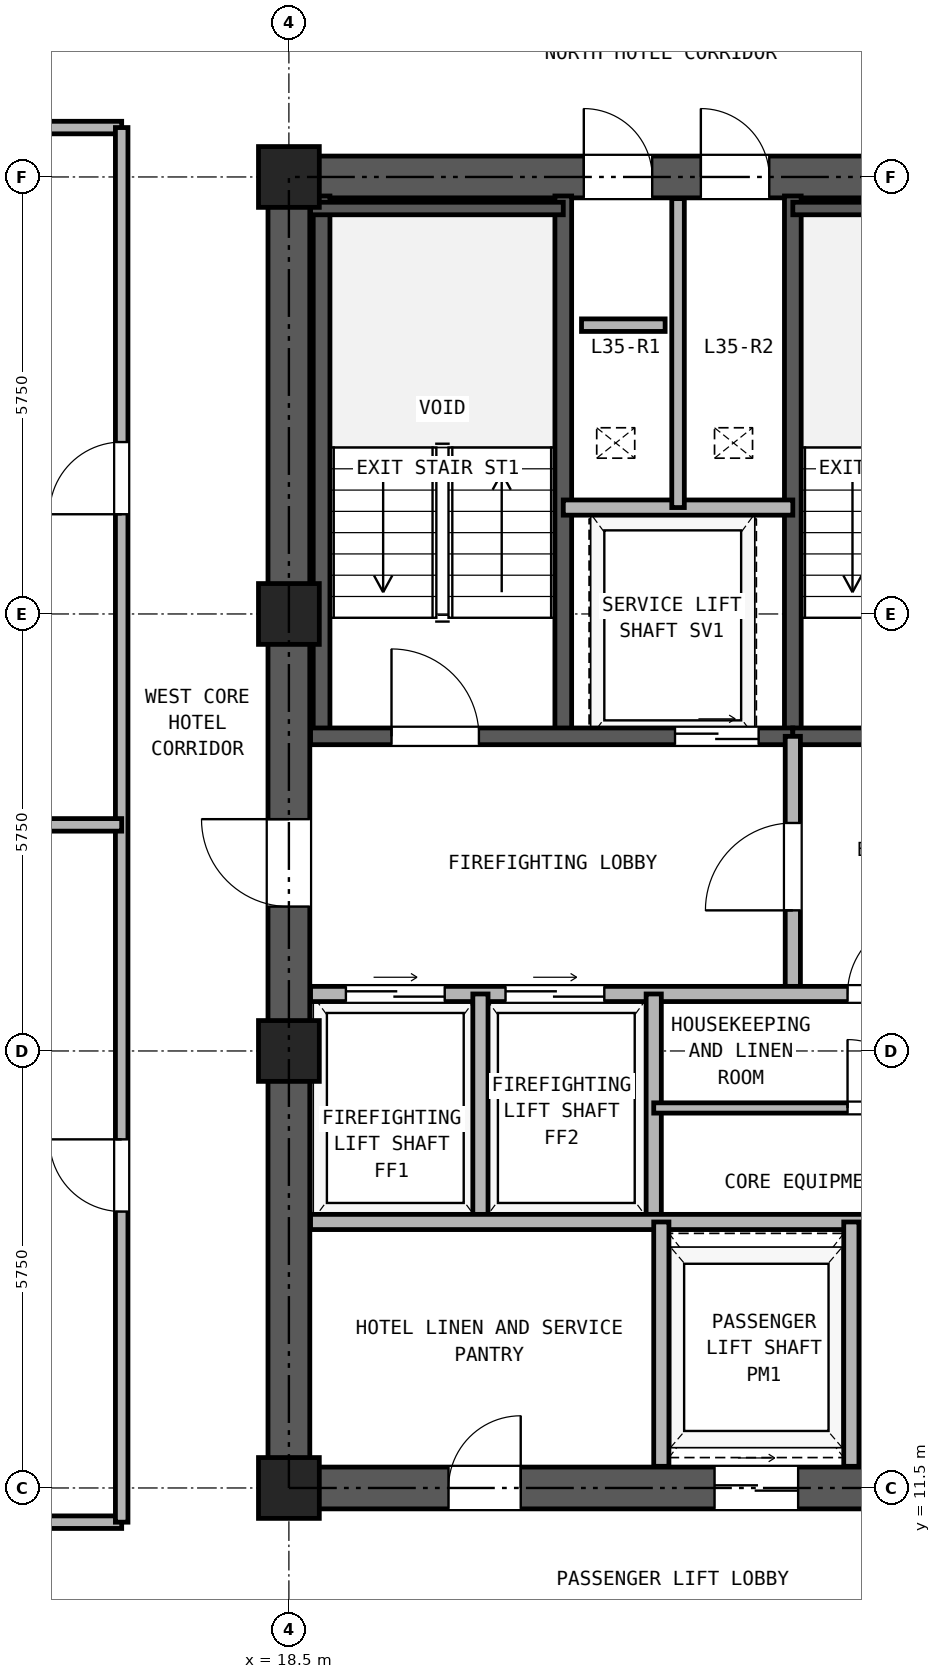
"""IFC4 building model, lengths in metres.
Left out: names, types, materials, properties, quantities, classifications, styles, units other than length and angle.
Written with IfcOpenShell. Run it as: python <this file> out.ifc"""

import sys

from ifc_helpers import new_model, si_unit, direction, frame, frame_2d, origin, origin_2d, place, context, subcontext, project, spatial, rectangle, hollow_rectangle, extrude, source, transform, mapped, element, fill, save


model = new_model("IFC4")
c1 = context("Model", 3, precision=1e-05, world=origin(), true_north=direction((0.0, 1.0)))
c2 = subcontext(c1, "Body", "Model", "MODEL_VIEW")
j1 = project(units=[si_unit("LENGTHUNIT", "METRE"), si_unit("PLANEANGLEUNIT", "RADIAN")], contexts=[c1])
p1 = place(None, origin())
s1 = spatial("IfcSite", under=j1, at=p1, CompositionType="ELEMENT")
p2 = place(p1, origin())
s2 = spatial("IfcBuilding", under=s1, at=p2, CompositionType="ELEMENT")
p3 = place(p2, frame((0.0, 0.0, 127.9)))
s3 = spatial("IfcBuildingStorey", under=s2, at=p3, CompositionType="ELEMENT", Elevation=127.9)
m1 = source(origin(), c2, "Body", "SweptSolid", [
    extrude(hollow_rectangle(XDim=0.8, YDim=0.8, WallThickness=0.045, at=origin_2d()), origin(), (0.0, 0.0, 1.0), 2.95),
])
for number, where, z_axis, x_axis in (
    (1, (18.5, 11.5, 0.0), (0.0, 0.0, 1.0), (1.0, 0.0, 0.0)),
    (2, (18.5, 17.25, 0.0), (0.0, 0.0, 1.0), (1.0, 0.0, 0.0)),
    (3, (18.5, 23.0, 0.0), (0.0, 0.0, 1.0), (1.0, 0.0, 0.0)),
    (4, (18.5, 28.75, 0.0), (0.0, 0.0, 1.0), (1.0, 0.0, 0.0)),
):
    element("IfcColumn", number, at=place(p3, frame(where, z_axis=z_axis, x_axis=x_axis)), inside=s3, PredefinedType="COLUMN", context=c2, shape_type="MappedRepresentation", body=[
        mapped(m1, transform((0.0, 0.0, 0.0), x_axis=(1.0, 0.0, 0.0), y_axis=(0.0, 1.0, 0.0), z_axis=(0.0, 0.0, 1.0), scale=1.0)),
    ])
p4 = place(p3, frame((18.225, 11.5, 0.0), z_axis=(0.0, 0.0, 1.0), x_axis=(1.0, 0.0, 0.0)))
e5 = element("IfcWall", 5, at=p4, inside=s3, PredefinedType="SHEAR", context=c2, shape_type="SweptSolid", body=[
    extrude(rectangle(XDim=10.55, YDim=0.55, at=frame_2d((5.275, 0.0))), origin(), (0.0, 0.0, 1.0), 2.95),
])
p5 = place(p4, frame((2.375, 0.0, 0.0)))
e6 = element("IfcOpeningElement", 6, at=p5, cuts=e5, PredefinedType="OPENING", context=c2, shape_type="SweptSolid", body=[
    extrude(rectangle(XDim=0.95, YDim=2.15, at=frame_2d((0.475, 1.075))), frame((0.0, 0.285, 0.0), z_axis=(0.0, -1.0, 0.0), x_axis=(1.0, 0.0, 0.0)), (0.0, 0.0, 1.0), 0.57),
])
p6 = place(p4, frame((5.875, 0.0, 0.0)))
e7 = element("IfcOpeningElement", 7, at=p6, cuts=e5, PredefinedType="OPENING", context=c2, shape_type="SweptSolid", body=[
    extrude(rectangle(XDim=1.1, YDim=2.25, at=frame_2d((0.55, 1.125))), frame((0.0, 0.285, 0.0), z_axis=(0.0, -1.0, 0.0), x_axis=(1.0, 0.0, 0.0)), (0.0, 0.0, 1.0), 0.57),
])
p7 = place(p4, frame((8.275, 0.0, 0.0)))
e8 = element("IfcOpeningElement", 8, at=p7, cuts=e5, PredefinedType="OPENING", context=c2, shape_type="SweptSolid", body=[
    extrude(rectangle(XDim=1.1, YDim=2.25, at=frame_2d((0.55, 1.125))), frame((0.0, 0.285, 0.0), z_axis=(0.0, -1.0, 0.0), x_axis=(1.0, 0.0, 0.0)), (0.0, 0.0, 1.0), 0.57),
])
p8 = place(p3, frame((18.225, 28.75, 0.0), z_axis=(0.0, 0.0, 1.0), x_axis=(1.0, 0.0, 0.0)))
e9 = element("IfcWall", 9, at=p8, inside=s3, PredefinedType="SHEAR", context=c2, shape_type="SweptSolid", body=[
    extrude(rectangle(XDim=10.55, YDim=0.55, at=frame_2d((5.275, 0.0))), origin(), (0.0, 0.0, 1.0), 2.95),
])
p9 = place(p8, frame((4.155, 0.0, 0.0)))
e10 = element("IfcOpeningElement", 10, at=p9, cuts=e9, PredefinedType="OPENING", context=c2, shape_type="SweptSolid", body=[
    extrude(rectangle(XDim=0.9, YDim=2.05, at=frame_2d((0.45, 1.025))), frame((0.0, 0.285, 0.0), z_axis=(0.0, -1.0, 0.0), x_axis=(1.0, 0.0, 0.0)), (0.0, 0.0, 1.0), 0.57),
])
p10 = place(p8, frame((5.695, 0.0, 0.0)))
e11 = element("IfcOpeningElement", 11, at=p10, cuts=e9, PredefinedType="OPENING", context=c2, shape_type="SweptSolid", body=[
    extrude(rectangle(XDim=0.9, YDim=2.05, at=frame_2d((0.45, 1.025))), frame((0.0, 0.285, 0.0), z_axis=(0.0, -1.0, 0.0), x_axis=(1.0, 0.0, 0.0)), (0.0, 0.0, 1.0), 0.57),
])
p11 = place(p3, frame((18.5, 11.775, 0.0), z_axis=(0.0, 0.0, 1.0), x_axis=(0.0, 1.0, 0.0)))
e12 = element("IfcWall", 12, at=p11, inside=s3, PredefinedType="SHEAR", context=c2, shape_type="SweptSolid", body=[
    extrude(rectangle(XDim=16.7, YDim=0.55, at=frame_2d((8.35, 0.0))), origin(), (0.0, 0.0, 1.0), 2.95),
])
p12 = place(p11, frame((7.375, 0.0, 0.0)))
e13 = element("IfcOpeningElement", 13, at=p12, cuts=e12, PredefinedType="OPENING", context=c2, shape_type="SweptSolid", body=[
    extrude(rectangle(XDim=1.15, YDim=2.2, at=frame_2d((0.575, 1.1))), frame((0.0, 0.285, 0.0), z_axis=(0.0, -1.0, 0.0), x_axis=(1.0, 0.0, 0.0)), (0.0, 0.0, 1.0), 0.57),
])
for number, where, z_axis, x_axis in (
    (14, (18.93, 21.39, 0.0), (0.0, 0.0, 1.0), (0.0, 1.0, 0.0)),
    (15, (22.11, 21.39, 0.0), (0.0, 0.0, 1.0), (0.0, 1.0, 0.0)),
    (16, (25.13, 21.39, 0.0), (0.0, 0.0, 1.0), (0.0, 1.0, 0.0)),
):
    element("IfcWall", number, at=place(p3, frame(where, z_axis=z_axis, x_axis=x_axis)), inside=s3, PredefinedType="SOLIDWALL", context=c2, shape_type="SweptSolid", body=[
        extrude(rectangle(XDim=7.11, YDim=0.22, at=frame_2d((3.555, 0.0))), origin(), (0.0, 0.0, 1.0), 2.95),
    ])
p13 = place(p3, frame((18.785, 28.335, 0.0), z_axis=(0.0, 0.0, 1.0), x_axis=(1.0, 0.0, 0.0)))
e17 = element("IfcWall", 17, at=p13, inside=s3, PredefinedType="PARTITIONING", context=c2, shape_type="SweptSolid", body=[
    extrude(rectangle(XDim=3.325, YDim=0.165, at=frame_2d((1.663, 0.0))), origin(), (0.0, 0.0, 1.0), 2.95),
])
p14 = place(p3, frame((25.13, 28.335, 0.0), z_axis=(0.0, 0.0, 1.0), x_axis=(1.0, 0.0, 0.0)))
e18 = element("IfcWall", 18, at=p14, inside=s3, PredefinedType="PARTITIONING", context=c2, shape_type="SweptSolid", body=[
    extrude(rectangle(XDim=3.085, YDim=0.165, at=frame_2d((1.542, 0.0))), origin(), (0.0, 0.0, 1.0), 2.95),
])
p15 = place(p3, frame((18.785, 21.39, 0.0), z_axis=(0.0, 0.0, 1.0), x_axis=(1.0, 0.0, 0.0)))
e19 = element("IfcWall", 19, at=p15, inside=s3, PredefinedType="SOLIDWALL", context=c2, shape_type="SweptSolid", body=[
    extrude(rectangle(XDim=6.345, YDim=0.22, at=frame_2d((3.172, 0.0))), origin(), (0.0, 0.0, 1.0), 2.95),
])
p16 = place(p15, frame((1.065, 0.0, 0.0)))
e20 = element("IfcOpeningElement", 20, at=p16, cuts=e19, PredefinedType="OPENING", context=c2, shape_type="SweptSolid", body=[
    extrude(rectangle(XDim=1.15, YDim=2.2, at=frame_2d((0.575, 1.1))), frame((0.0, 0.12, 0.0), z_axis=(0.0, -1.0, 0.0), x_axis=(1.0, 0.0, 0.0)), (0.0, 0.0, 1.0), 0.24),
])
p17 = place(p15, frame((4.795, 0.0, 0.0)))
e21 = element("IfcOpeningElement", 21, at=p17, cuts=e19, PredefinedType="OPENING", context=c2, shape_type="SweptSolid", body=[
    extrude(rectangle(XDim=1.1, YDim=2.25, at=frame_2d((0.55, 1.125))), frame((0.0, 0.12, 0.0), z_axis=(0.0, -1.0, 0.0), x_axis=(1.0, 0.0, 0.0)), (0.0, 0.0, 1.0), 0.24),
])
p18 = place(p3, frame((25.13, 21.39, 0.0), z_axis=(0.0, 0.0, 1.0), x_axis=(1.0, 0.0, 0.0)))
e22 = element("IfcWall", 22, at=p18, inside=s3, PredefinedType="SOLIDWALL", context=c2, shape_type="SweptSolid", body=[
    extrude(rectangle(XDim=3.085, YDim=0.22, at=frame_2d((1.542, 0.0))), origin(), (0.0, 0.0, 1.0), 2.95),
])
p19 = place(p18, frame((0.92, 0.0, 0.0)))
e23 = element("IfcOpeningElement", 23, at=p19, cuts=e22, PredefinedType="OPENING", context=c2, shape_type="SweptSolid", body=[
    extrude(rectangle(XDim=1.15, YDim=2.2, at=frame_2d((0.575, 1.1))), frame((0.0, 0.12, 0.0), z_axis=(0.0, -1.0, 0.0), x_axis=(1.0, 0.0, 0.0)), (0.0, 0.0, 1.0), 0.24),
])
p20 = place(p3, frame((22.11, 24.4, 0.0), z_axis=(0.0, 0.0, 1.0), x_axis=(1.0, 0.0, 0.0)))
e24 = element("IfcWall", 24, at=p20, inside=s3, PredefinedType="PARTITIONING", context=c2, shape_type="SweptSolid", body=[
    extrude(rectangle(XDim=3.02, YDim=0.2, at=frame_2d((1.51, 0.0))), origin(), (0.0, 0.0, 1.0), 2.95),
])
p21 = place(p3, frame((23.62, 24.4, 0.0), z_axis=(0.0, 0.0, 1.0), x_axis=(0.0, 1.0, 0.0)))
e25 = element("IfcWall", 25, at=p21, inside=s3, PredefinedType="PARTITIONING", context=c2, shape_type="SweptSolid", body=[
    extrude(rectangle(XDim=4.065, YDim=0.165, at=frame_2d((2.033, 0.0))), origin(), (0.0, 0.0, 1.0), 2.95),
])
p22 = place(p3, frame((25.13, 18.0, 0.0), z_axis=(0.0, 0.0, 1.0), x_axis=(0.0, 1.0, 0.0)))
e26 = element("IfcWall", 26, at=p22, inside=s3, PredefinedType="PARTITIONING", context=c2, shape_type="SweptSolid", body=[
    extrude(rectangle(XDim=3.39, YDim=0.2, at=frame_2d((1.695, 0.0))), origin(), (0.0, 0.0, 1.0), 2.95),
])
p23 = place(p22, frame((1.1, 0.0, 0.0)))
e27 = element("IfcOpeningElement", 27, at=p23, cuts=e26, PredefinedType="OPENING", context=c2, shape_type="SweptSolid", body=[
    extrude(rectangle(XDim=1.15, YDim=2.2, at=frame_2d((0.575, 1.1))), frame((0.0, 0.11, 0.0), z_axis=(0.0, -1.0, 0.0), x_axis=(1.0, 0.0, 0.0)), (0.0, 0.0, 1.0), 0.22),
])
p24 = place(p3, frame((18.785, 18.0, 0.0), z_axis=(0.0, 0.0, 1.0), x_axis=(1.0, 0.0, 0.0)))
e28 = element("IfcWall", 28, at=p24, inside=s3, PredefinedType="PARTITIONING", context=c2, shape_type="SweptSolid", body=[
    extrude(rectangle(XDim=9.43, YDim=0.2, at=frame_2d((4.715, 0.0))), origin(), (0.0, 0.0, 1.0), 2.95),
])
p25 = place(p24, frame((0.465, 0.0, 0.0)))
e29 = element("IfcOpeningElement", 29, at=p25, cuts=e28, PredefinedType="OPENING", context=c2, shape_type="SweptSolid", body=[
    extrude(rectangle(XDim=1.3, YDim=2.3, at=frame_2d((0.65, 1.15))), frame((0.0, 0.11, 0.0), z_axis=(0.0, -1.0, 0.0), x_axis=(1.0, 0.0, 0.0)), (0.0, 0.0, 1.0), 0.22),
])
p26 = place(p24, frame((2.565, 0.0, 0.0)))
e30 = element("IfcOpeningElement", 30, at=p26, cuts=e28, PredefinedType="OPENING", context=c2, shape_type="SweptSolid", body=[
    extrude(rectangle(XDim=1.3, YDim=2.3, at=frame_2d((0.65, 1.15))), frame((0.0, 0.11, 0.0), z_axis=(0.0, -1.0, 0.0), x_axis=(1.0, 0.0, 0.0)), (0.0, 0.0, 1.0), 0.22),
])
p27 = place(p24, frame((7.065, 0.0, 0.0)))
e31 = element("IfcOpeningElement", 31, at=p27, cuts=e28, PredefinedType="OPENING", context=c2, shape_type="SweptSolid", body=[
    extrude(rectangle(XDim=1.0, YDim=2.15, at=frame_2d((0.5, 1.075))), frame((0.0, 0.11, 0.0), z_axis=(0.0, -1.0, 0.0), x_axis=(1.0, 0.0, 0.0)), (0.0, 0.0, 1.0), 0.22),
])
for number, where, z_axis, x_axis in (
    (32, (21.02, 15.0, 0.0), (0.0, 0.0, 1.0), (0.0, 1.0, 0.0)),
    (33, (23.3, 15.0, 0.0), (0.0, 0.0, 1.0), (0.0, 1.0, 0.0)),
):
    element("IfcWall", number, at=place(p3, frame(where, z_axis=z_axis, x_axis=x_axis)), inside=s3, PredefinedType="PARTITIONING", context=c2, shape_type="SweptSolid", body=[
        extrude(rectangle(XDim=3.0, YDim=0.2, at=frame_2d((1.5, 0.0))), origin(), (0.0, 0.0, 1.0), 2.95),
    ])
p28 = place(p3, frame((18.785, 15.0, 0.0), z_axis=(0.0, 0.0, 1.0), x_axis=(1.0, 0.0, 0.0)))
e34 = element("IfcWall", 34, at=p28, inside=s3, PredefinedType="PARTITIONING", context=c2, shape_type="SweptSolid", body=[
    extrude(rectangle(XDim=9.43, YDim=0.2, at=frame_2d((4.715, 0.0))), origin(), (0.0, 0.0, 1.0), 2.95),
])
p29 = place(p3, frame((23.3, 16.5, 0.0), z_axis=(0.0, 0.0, 1.0), x_axis=(1.0, 0.0, 0.0)))
e35 = element("IfcWall", 35, at=p29, inside=s3, PredefinedType="PARTITIONING", context=c2, shape_type="SweptSolid", body=[
    extrude(rectangle(XDim=4.915, YDim=0.135, at=frame_2d((2.458, 0.0))), origin(), (0.0, 0.0, 1.0), 2.95),
])
p30 = place(p29, frame((2.55, 0.0, 0.0)))
e36 = element("IfcOpeningElement", 36, at=p30, cuts=e35, PredefinedType="OPENING", context=c2, shape_type="SweptSolid", body=[
    extrude(rectangle(XDim=0.9, YDim=2.05, at=frame_2d((0.45, 1.025))), frame((0.0, 0.077, 0.0), z_axis=(0.0, -1.0, 0.0), x_axis=(1.0, 0.0, 0.0)), (0.0, 0.0, 1.0), 0.155),
])
for number, where, z_axis, x_axis in (
    (37, (23.4, 11.785, 0.0), (0.0, 0.0, 1.0), (0.0, 1.0, 0.0)),
    (38, (25.9, 11.785, 0.0), (0.0, 0.0, 1.0), (0.0, 1.0, 0.0)),
):
    element("IfcWall", number, at=place(p3, frame(where, z_axis=z_axis, x_axis=x_axis)), inside=s3, PredefinedType="PARTITIONING", context=c2, shape_type="SweptSolid", body=[
        extrude(rectangle(XDim=3.215, YDim=0.2, at=frame_2d((1.607, 0.0))), origin(), (0.0, 0.0, 1.0), 2.95),
    ])
for number, where, z_axis, x_axis in (
    (39, (9.6, 11.05, 0.0), (0.0, 0.0, 1.0), (1.0, 0.0, 0.0)),
    (40, (9.6, 29.4, 0.0), (0.0, 0.0, 1.0), (1.0, 0.0, 0.0)),
):
    element("IfcWall", number, at=place(p3, frame(where, z_axis=z_axis, x_axis=x_axis)), inside=s3, PredefinedType="PARTITIONING", context=c2, shape_type="SweptSolid", body=[
        extrude(rectangle(XDim=6.7, YDim=0.165, at=frame_2d((3.35, 0.0))), origin(), (0.0, 0.0, 1.0), 2.95),
    ])
p31 = place(p3, frame((16.3, 11.05, 0.0), z_axis=(0.0, 0.0, 1.0), x_axis=(0.0, 1.0, 0.0)))
e41 = element("IfcWall", 41, at=p31, inside=s3, PredefinedType="PARTITIONING", context=c2, shape_type="SweptSolid", body=[
    extrude(rectangle(XDim=18.35, YDim=0.165, at=frame_2d((9.175, 0.0))), origin(), (0.0, 0.0, 1.0), 2.95),
])
p32 = place(p31, frame((4.087, 0.0, 0.0)))
e42 = element("IfcOpeningElement", 42, at=p32, cuts=e41, PredefinedType="OPENING", context=c2, shape_type="SweptSolid", body=[
    extrude(rectangle(XDim=0.95, YDim=2.15, at=frame_2d((0.475, 1.075))), frame((0.0, 0.093, 0.0), z_axis=(0.0, -1.0, 0.0), x_axis=(1.0, 0.0, 0.0)), (0.0, 0.0, 1.0), 0.185),
])
p33 = place(p31, frame((13.262, 0.0, 0.0)))
e43 = element("IfcOpeningElement", 43, at=p33, cuts=e41, PredefinedType="OPENING", context=c2, shape_type="SweptSolid", body=[
    extrude(rectangle(XDim=0.95, YDim=2.15, at=frame_2d((0.475, 1.075))), frame((0.0, 0.093, 0.0), z_axis=(0.0, -1.0, 0.0), x_axis=(1.0, 0.0, 0.0)), (0.0, 0.0, 1.0), 0.185),
])
p34 = place(p3, frame((0.16, 20.225, 0.0), z_axis=(0.0, 0.0, 1.0), x_axis=(1.0, 0.0, 0.0)))
e44 = element("IfcWall", 44, at=p34, inside=s3, PredefinedType="PARTITIONING", context=c2, shape_type="SweptSolid", body=[
    extrude(rectangle(XDim=16.14, YDim=0.165, at=frame_2d((8.07, 0.0))), origin(), (0.0, 0.0, 1.0), 2.583),
])
p35 = place(p3, frame((22.35, 26.8, 0.0), z_axis=(0.0, 0.0, 1.0), x_axis=(1.0, 0.0, 0.0)))
e45 = element("IfcWall", 45, at=p35, inside=s3, PredefinedType="PARTITIONING", context=c2, shape_type="SweptSolid", body=[
    extrude(rectangle(XDim=1.1, YDim=0.165, at=frame_2d((0.55, 0.0))), origin(), (0.0, 0.0, 1.0), 2.95),
])
p36 = place(p16, frame((1.15, 0.0, 0.0), z_axis=(0.0, 0.0, 1.0), x_axis=(-1.0, 0.0, 0.0)))
e46 = element("IfcDoor", 46, at=p36, inside=s3, OperationType="SINGLE_SWING_LEFT", PredefinedType="DOOR", context=c2, shape_type="SweptSolid", body=[
    extrude(rectangle(XDim=1.15, YDim=2.2, at=frame_2d((0.575, 1.1))), frame((0.0, 0.025, 0.0), z_axis=(0.0, -1.0, 0.0), x_axis=(1.0, 0.0, 0.0)), (0.0, 0.0, 1.0), 0.05),
])
fill(e20, e46)
p37 = place(p17, frame((1.1, 0.0, 0.0), z_axis=(0.0, 0.0, 1.0), x_axis=(-1.0, 0.0, 0.0)))
e47 = element("IfcDoor", 47, at=p37, inside=s3, OperationType="DOUBLE_DOOR_SLIDING", PredefinedType="DOOR", context=c2, shape_type="SweptSolid", body=[
    extrude(rectangle(XDim=1.1, YDim=2.25, at=frame_2d((0.55, 1.125))), frame((0.0, 0.025, 0.0), z_axis=(0.0, -1.0, 0.0), x_axis=(1.0, 0.0, 0.0)), (0.0, 0.0, 1.0), 0.05),
])
fill(e21, e47)
p38 = place(p23, origin())
e48 = element("IfcDoor", 48, at=p38, inside=s3, OperationType="SINGLE_SWING_LEFT", PredefinedType="DOOR", context=c2, shape_type="SweptSolid", body=[
    extrude(rectangle(XDim=1.15, YDim=2.2, at=frame_2d((0.575, 1.1))), frame((0.0, 0.025, 0.0), z_axis=(0.0, -1.0, 0.0), x_axis=(1.0, 0.0, 0.0)), (0.0, 0.0, 1.0), 0.05),
])
fill(e27, e48)
p39 = place(p25, origin())
e49 = element("IfcDoor", 49, at=p39, inside=s3, OperationType="DOUBLE_DOOR_SLIDING", PredefinedType="DOOR", context=c2, shape_type="SweptSolid", body=[
    extrude(rectangle(XDim=1.3, YDim=2.3, at=frame_2d((0.65, 1.15))), frame((0.0, 0.025, 0.0), z_axis=(0.0, -1.0, 0.0), x_axis=(1.0, 0.0, 0.0)), (0.0, 0.0, 1.0), 0.05),
])
fill(e29, e49)
p40 = place(p26, origin())
e50 = element("IfcDoor", 50, at=p40, inside=s3, OperationType="DOUBLE_DOOR_SLIDING", PredefinedType="DOOR", context=c2, shape_type="SweptSolid", body=[
    extrude(rectangle(XDim=1.3, YDim=2.3, at=frame_2d((0.65, 1.15))), frame((0.0, 0.025, 0.0), z_axis=(0.0, -1.0, 0.0), x_axis=(1.0, 0.0, 0.0)), (0.0, 0.0, 1.0), 0.05),
])
fill(e30, e50)
p41 = place(p27, frame((1.0, 0.0, 0.0), z_axis=(0.0, 0.0, 1.0), x_axis=(-1.0, 0.0, 0.0)))
e51 = element("IfcDoor", 51, at=p41, inside=s3, OperationType="SINGLE_SWING_RIGHT", PredefinedType="DOOR", context=c2, shape_type="SweptSolid", body=[
    extrude(rectangle(XDim=1.0, YDim=2.15, at=frame_2d((0.5, 1.075))), frame((0.0, 0.025, 0.0), z_axis=(0.0, -1.0, 0.0), x_axis=(1.0, 0.0, 0.0)), (0.0, 0.0, 1.0), 0.05),
])
fill(e31, e51)
p42 = place(p30, frame((0.9, 0.0, 0.0), z_axis=(0.0, 0.0, 1.0), x_axis=(-1.0, 0.0, 0.0)))
e52 = element("IfcDoor", 52, at=p42, inside=s3, OperationType="SINGLE_SWING_LEFT", PredefinedType="DOOR", context=c2, shape_type="SweptSolid", body=[
    extrude(rectangle(XDim=0.9, YDim=2.05, at=frame_2d((0.45, 1.025))), frame((0.0, 0.025, 0.0), z_axis=(0.0, -1.0, 0.0), x_axis=(1.0, 0.0, 0.0)), (0.0, 0.0, 1.0), 0.05),
])
fill(e36, e52)
p43 = place(p12, frame((1.15, 0.0, 0.0), z_axis=(0.0, 0.0, 1.0), x_axis=(-1.0, 0.0, 0.0)))
e53 = element("IfcDoor", 53, at=p43, inside=s3, OperationType="SINGLE_SWING_RIGHT", PredefinedType="DOOR", context=c2, shape_type="SweptSolid", body=[
    extrude(rectangle(XDim=1.15, YDim=2.2, at=frame_2d((0.575, 1.1))), frame((0.0, 0.025, 0.0), z_axis=(0.0, -1.0, 0.0), x_axis=(1.0, 0.0, 0.0)), (0.0, 0.0, 1.0), 0.05),
])
fill(e13, e53)
p44 = place(p9, origin())
e54 = element("IfcDoor", 54, at=p44, inside=s3, OperationType="SINGLE_SWING_LEFT", PredefinedType="DOOR", context=c2, shape_type="SweptSolid", body=[
    extrude(rectangle(XDim=0.9, YDim=2.05, at=frame_2d((0.45, 1.025))), frame((0.0, 0.025, 0.0), z_axis=(0.0, -1.0, 0.0), x_axis=(1.0, 0.0, 0.0)), (0.0, 0.0, 1.0), 0.05),
])
fill(e10, e54)
p45 = place(p10, origin())
e55 = element("IfcDoor", 55, at=p45, inside=s3, OperationType="SINGLE_SWING_LEFT", PredefinedType="DOOR", context=c2, shape_type="SweptSolid", body=[
    extrude(rectangle(XDim=0.9, YDim=2.05, at=frame_2d((0.45, 1.025))), frame((0.0, 0.025, 0.0), z_axis=(0.0, -1.0, 0.0), x_axis=(1.0, 0.0, 0.0)), (0.0, 0.0, 1.0), 0.05),
])
fill(e11, e55)
p46 = place(p5, frame((0.95, 0.0, 0.0), z_axis=(0.0, 0.0, 1.0), x_axis=(-1.0, 0.0, 0.0)))
e56 = element("IfcDoor", 56, at=p46, inside=s3, OperationType="SINGLE_SWING_RIGHT", PredefinedType="DOOR", context=c2, shape_type="SweptSolid", body=[
    extrude(rectangle(XDim=0.95, YDim=2.15, at=frame_2d((0.475, 1.075))), frame((0.0, 0.025, 0.0), z_axis=(0.0, -1.0, 0.0), x_axis=(1.0, 0.0, 0.0)), (0.0, 0.0, 1.0), 0.05),
])
fill(e6, e56)
p47 = place(p6, frame((1.1, 0.0, 0.0), z_axis=(0.0, 0.0, 1.0), x_axis=(-1.0, 0.0, 0.0)))
e57 = element("IfcDoor", 57, at=p47, inside=s3, OperationType="DOUBLE_DOOR_SLIDING", PredefinedType="DOOR", context=c2, shape_type="SweptSolid", body=[
    extrude(rectangle(XDim=1.1, YDim=2.25, at=frame_2d((0.55, 1.125))), frame((0.0, 0.025, 0.0), z_axis=(0.0, -1.0, 0.0), x_axis=(1.0, 0.0, 0.0)), (0.0, 0.0, 1.0), 0.05),
])
fill(e7, e57)
p48 = place(p32, frame((0.95, 0.0, 0.0), z_axis=(0.0, 0.0, 1.0), x_axis=(-1.0, 0.0, 0.0)))
e58 = element("IfcDoor", 58, at=p48, inside=s3, OperationType="SINGLE_SWING_RIGHT", PredefinedType="DOOR", context=c2, shape_type="SweptSolid", body=[
    extrude(rectangle(XDim=0.95, YDim=2.15, at=frame_2d((0.475, 1.075))), frame((0.0, 0.025, 0.0), z_axis=(0.0, -1.0, 0.0), x_axis=(1.0, 0.0, 0.0)), (0.0, 0.0, 1.0), 0.05),
])
fill(e42, e58)
p49 = place(p33, frame((0.95, 0.0, 0.0), z_axis=(0.0, 0.0, 1.0), x_axis=(-1.0, 0.0, 0.0)))
e59 = element("IfcDoor", 59, at=p49, inside=s3, OperationType="SINGLE_SWING_LEFT", PredefinedType="DOOR", context=c2, shape_type="SweptSolid", body=[
    extrude(rectangle(XDim=0.95, YDim=2.15, at=frame_2d((0.475, 1.075))), frame((0.0, 0.025, 0.0), z_axis=(0.0, -1.0, 0.0), x_axis=(1.0, 0.0, 0.0)), (0.0, 0.0, 1.0), 0.05),
])
fill(e43, e59)
save(model, sys.argv[1])
